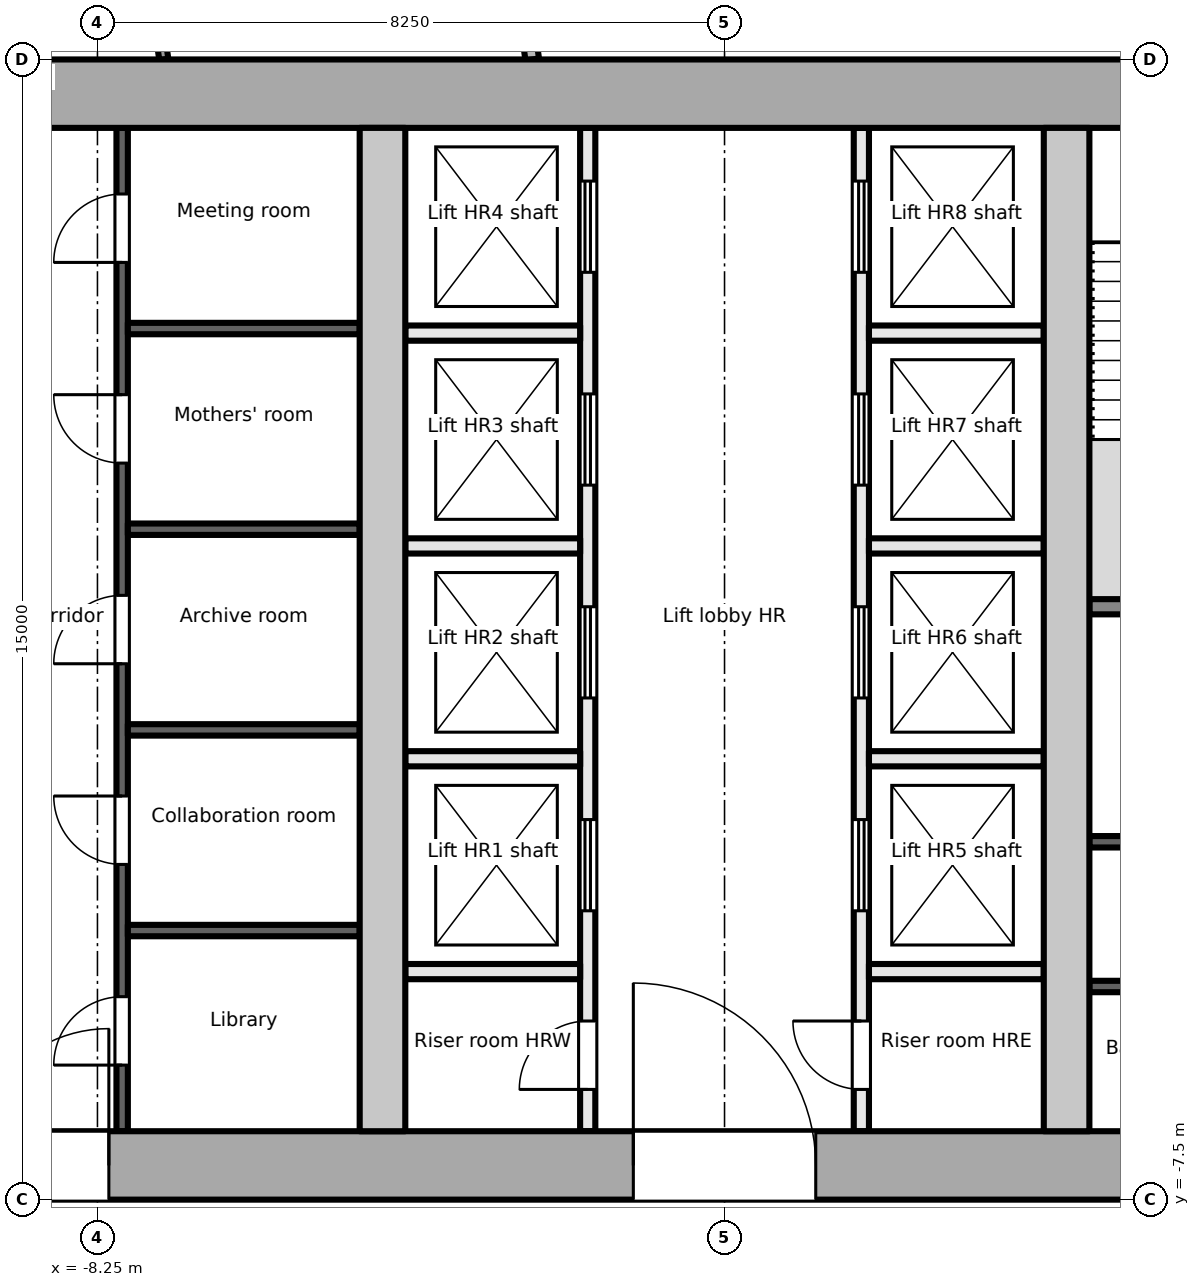
"""IFC4 building model, lengths in metres.
Left out: names, types, materials, properties, quantities, classifications, styles, units other than length and angle.
Written with IfcOpenShell. Run it as: python <this file> out.ifc"""

import sys

from ifc_helpers import new_model, si_unit, direction, frame, frame_2d, origin, place, context, subcontext, project, spatial, rectangle, extrude, element, fill, save


model = new_model("IFC4")
c1 = context("Model", 3, precision=1e-05, world=origin(), true_north=direction((0.0, 1.0)))
c2 = subcontext(c1, "Body", "Model", "MODEL_VIEW")
j1 = project(units=[si_unit("LENGTHUNIT", "METRE"), si_unit("PLANEANGLEUNIT", "RADIAN")], contexts=[c1])
p1 = place(None, origin())
s1 = spatial("IfcSite", under=j1, at=p1, CompositionType="ELEMENT")
p2 = place(p1, origin())
s2 = spatial("IfcBuilding", under=s1, at=p2, CompositionType="ELEMENT")
p3 = place(p2, frame((0.0, 0.0, 233.0)))
s3 = spatial("IfcBuildingStorey", under=s2, at=p3, CompositionType="ELEMENT", Elevation=233.0)
p4 = place(p3, frame((-18.0, -7.05, -0.2), z_axis=(0.0, 0.0, 1.0), x_axis=(1.0, 0.0, 0.0)))
e1 = element("IfcWall", 1, at=p4, inside=s3, PredefinedType="SHEAR", context=c2, shape_type="SweptSolid", body=[
    extrude(rectangle(XDim=36.0, YDim=0.9, at=frame_2d((18.0, 0.0))), origin(), (0.0, 0.0, 1.0), 3.9),
])
p5 = place(p4, frame((8.1, 0.0, 0.2)))
e2 = element("IfcOpeningElement", 2, at=p5, cuts=e1, PredefinedType="OPENING", context=c2, shape_type="SweptSolid", body=[
    extrude(rectangle(XDim=1.8, YDim=2.1, at=frame_2d((0.9, 1.05))), frame((0.0, 0.46, 0.0), z_axis=(0.0, -1.0, 0.0), x_axis=(1.0, 0.0, 0.0)), (0.0, 0.0, 1.0), 0.921),
])
p6 = place(p4, frame((16.8, 0.0, 0.2)))
e3 = element("IfcOpeningElement", 3, at=p6, cuts=e1, PredefinedType="OPENING", context=c2, shape_type="SweptSolid", body=[
    extrude(rectangle(XDim=2.4, YDim=2.1, at=frame_2d((1.2, 1.05))), frame((0.0, 0.46, 0.0), z_axis=(0.0, -1.0, 0.0), x_axis=(1.0, 0.0, 0.0)), (0.0, 0.0, 1.0), 0.921),
])
p7 = place(p4, frame((26.1, 0.0, 0.2)))
e4 = element("IfcOpeningElement", 4, at=p7, cuts=e1, PredefinedType="OPENING", context=c2, shape_type="SweptSolid", body=[
    extrude(rectangle(XDim=2.4, YDim=2.1, at=frame_2d((1.2, 1.05))), frame((0.0, 0.46, 0.0), z_axis=(0.0, -1.0, 0.0), x_axis=(1.0, 0.0, 0.0)), (0.0, 0.0, 1.0), 0.921),
])
p8 = place(p3, frame((-18.0, 7.05, -0.2), z_axis=(0.0, 0.0, 1.0), x_axis=(1.0, 0.0, 0.0)))
e5 = element("IfcWall", 5, at=p8, inside=s3, PredefinedType="SHEAR", context=c2, shape_type="SweptSolid", body=[
    extrude(rectangle(XDim=36.0, YDim=0.9, at=frame_2d((18.0, 0.0))), origin(), (0.0, 0.0, 1.0), 3.9),
])
for number, where, z_axis, x_axis in (
    (6, (-4.5, -6.6, -0.2), (0.0, 0.0, 1.0), (0.0, 1.0, 0.0)),
    (7, (4.5, -6.6, -0.2), (0.0, 0.0, 1.0), (0.0, 1.0, 0.0)),
):
    element("IfcWall", number, at=place(p3, frame(where, z_axis=z_axis, x_axis=x_axis)), inside=s3, PredefinedType="SHEAR", context=c2, shape_type="SweptSolid", body=[
        extrude(rectangle(XDim=13.2, YDim=0.6, at=frame_2d((6.6, 0.0))), origin(), (0.0, 0.0, 1.0), 3.9),
    ])
p9 = place(p3, frame((-7.925, -6.6, 0.0), z_axis=(0.0, 0.0, 1.0), x_axis=(0.0, 1.0, 0.0)))
e8 = element("IfcWall", 8, at=p9, inside=s3, PredefinedType="PARTITIONING", context=c2, shape_type="SweptSolid", body=[
    extrude(rectangle(XDim=13.2, YDim=0.15, at=frame_2d((6.6, 0.0))), origin(), (0.0, 0.0, 1.0), 3.7),
])
p10 = place(p9, frame((0.87, 0.0, 0.0)))
e9 = element("IfcOpeningElement", 9, at=p10, cuts=e8, PredefinedType="OPENING", context=c2, shape_type="SweptSolid", body=[
    extrude(rectangle(XDim=0.9, YDim=2.1, at=frame_2d((0.45, 1.05))), frame((0.0, 0.085, 0.0), z_axis=(0.0, -1.0, 0.0), x_axis=(1.0, 0.0, 0.0)), (0.0, 0.0, 1.0), 0.171),
])
p11 = place(p9, frame((3.51, 0.0, 0.0)))
e10 = element("IfcOpeningElement", 10, at=p11, cuts=e8, PredefinedType="OPENING", context=c2, shape_type="SweptSolid", body=[
    extrude(rectangle(XDim=0.9, YDim=2.1, at=frame_2d((0.45, 1.05))), frame((0.0, 0.085, 0.0), z_axis=(0.0, -1.0, 0.0), x_axis=(1.0, 0.0, 0.0)), (0.0, 0.0, 1.0), 0.171),
])
p12 = place(p9, frame((6.15, 0.0, 0.0)))
e11 = element("IfcOpeningElement", 11, at=p12, cuts=e8, PredefinedType="OPENING", context=c2, shape_type="SweptSolid", body=[
    extrude(rectangle(XDim=0.9, YDim=2.1, at=frame_2d((0.45, 1.05))), frame((0.0, 0.085, 0.0), z_axis=(0.0, -1.0, 0.0), x_axis=(1.0, 0.0, 0.0)), (0.0, 0.0, 1.0), 0.171),
])
p13 = place(p9, frame((8.79, 0.0, 0.0)))
e12 = element("IfcOpeningElement", 12, at=p13, cuts=e8, PredefinedType="OPENING", context=c2, shape_type="SweptSolid", body=[
    extrude(rectangle(XDim=0.9, YDim=2.1, at=frame_2d((0.45, 1.05))), frame((0.0, 0.085, 0.0), z_axis=(0.0, -1.0, 0.0), x_axis=(1.0, 0.0, 0.0)), (0.0, 0.0, 1.0), 0.171),
])
p14 = place(p9, frame((11.43, 0.0, 0.0)))
e13 = element("IfcOpeningElement", 13, at=p14, cuts=e8, PredefinedType="OPENING", context=c2, shape_type="SweptSolid", body=[
    extrude(rectangle(XDim=0.9, YDim=2.1, at=frame_2d((0.45, 1.05))), frame((0.0, 0.085, 0.0), z_axis=(0.0, -1.0, 0.0), x_axis=(1.0, 0.0, 0.0)), (0.0, 0.0, 1.0), 0.171),
])
for number, where, z_axis, x_axis in (
    (14, (-7.85, -3.96, 0.0), (0.0, 0.0, 1.0), (1.0, 0.0, 0.0)),
    (15, (-7.85, -1.32, 0.0), (0.0, 0.0, 1.0), (1.0, 0.0, 0.0)),
    (16, (-7.85, 1.32, 0.0), (0.0, 0.0, 1.0), (1.0, 0.0, 0.0)),
    (17, (-7.85, 3.96, 0.0), (0.0, 0.0, 1.0), (1.0, 0.0, 0.0)),
):
    element("IfcWall", number, at=place(p3, frame(where, z_axis=z_axis, x_axis=x_axis)), inside=s3, PredefinedType="PARTITIONING", context=c2, shape_type="SweptSolid", body=[
        extrude(rectangle(XDim=3.05, YDim=0.15, at=frame_2d((1.525, 0.0))), origin(), (0.0, 0.0, 1.0), 3.7),
    ])
p15 = place(p3, frame((-1.8, -6.6, 0.0), z_axis=(0.0, 0.0, 1.0), x_axis=(0.0, 1.0, 0.0)))
e18 = element("IfcWall", 18, at=p15, inside=s3, PredefinedType="PARTITIONING", context=c2, shape_type="SweptSolid", body=[
    extrude(rectangle(XDim=13.2, YDim=0.2, at=frame_2d((6.6, 0.0))), origin(), (0.0, 0.0, 1.0), 3.7),
])
p16 = place(p15, frame((0.55, 0.0, 0.0)))
e19 = element("IfcOpeningElement", 19, at=p16, cuts=e18, PredefinedType="OPENING", context=c2, shape_type="SweptSolid", body=[
    extrude(rectangle(XDim=0.9, YDim=2.1, at=frame_2d((0.45, 1.05))), frame((0.0, 0.111, 0.0), z_axis=(0.0, -1.0, 0.0), x_axis=(1.0, 0.0, 0.0)), (0.0, 0.0, 1.0), 0.221),
])
p17 = place(p15, frame((2.9, 0.0, 0.0)))
e20 = element("IfcOpeningElement", 20, at=p17, cuts=e18, PredefinedType="OPENING", context=c2, shape_type="SweptSolid", body=[
    extrude(rectangle(XDim=1.2, YDim=2.1, at=frame_2d((0.6, 1.05))), frame((0.0, 0.111, 0.0), z_axis=(0.0, -1.0, 0.0), x_axis=(1.0, 0.0, 0.0)), (0.0, 0.0, 1.0), 0.221),
])
p18 = place(p15, frame((5.7, 0.0, 0.0)))
e21 = element("IfcOpeningElement", 21, at=p18, cuts=e18, PredefinedType="OPENING", context=c2, shape_type="SweptSolid", body=[
    extrude(rectangle(XDim=1.2, YDim=2.1, at=frame_2d((0.6, 1.05))), frame((0.0, 0.111, 0.0), z_axis=(0.0, -1.0, 0.0), x_axis=(1.0, 0.0, 0.0)), (0.0, 0.0, 1.0), 0.221),
])
p19 = place(p15, frame((8.5, 0.0, 0.0)))
e22 = element("IfcOpeningElement", 22, at=p19, cuts=e18, PredefinedType="OPENING", context=c2, shape_type="SweptSolid", body=[
    extrude(rectangle(XDim=1.2, YDim=2.1, at=frame_2d((0.6, 1.05))), frame((0.0, 0.111, 0.0), z_axis=(0.0, -1.0, 0.0), x_axis=(1.0, 0.0, 0.0)), (0.0, 0.0, 1.0), 0.221),
])
p20 = place(p15, frame((11.3, 0.0, 0.0)))
e23 = element("IfcOpeningElement", 23, at=p20, cuts=e18, PredefinedType="OPENING", context=c2, shape_type="SweptSolid", body=[
    extrude(rectangle(XDim=1.2, YDim=2.1, at=frame_2d((0.6, 1.05))), frame((0.0, 0.111, 0.0), z_axis=(0.0, -1.0, 0.0), x_axis=(1.0, 0.0, 0.0)), (0.0, 0.0, 1.0), 0.221),
])
p21 = place(p3, frame((1.8, -6.6, 0.0), z_axis=(0.0, 0.0, 1.0), x_axis=(0.0, 1.0, 0.0)))
e24 = element("IfcWall", 24, at=p21, inside=s3, PredefinedType="PARTITIONING", context=c2, shape_type="SweptSolid", body=[
    extrude(rectangle(XDim=13.2, YDim=0.2, at=frame_2d((6.6, 0.0))), origin(), (0.0, 0.0, 1.0), 3.7),
])
p22 = place(p21, frame((0.55, 0.0, 0.0)))
e25 = element("IfcOpeningElement", 25, at=p22, cuts=e24, PredefinedType="OPENING", context=c2, shape_type="SweptSolid", body=[
    extrude(rectangle(XDim=0.9, YDim=2.1, at=frame_2d((0.45, 1.05))), frame((0.0, 0.111, 0.0), z_axis=(0.0, -1.0, 0.0), x_axis=(1.0, 0.0, 0.0)), (0.0, 0.0, 1.0), 0.221),
])
p23 = place(p21, frame((2.9, 0.0, 0.0)))
e26 = element("IfcOpeningElement", 26, at=p23, cuts=e24, PredefinedType="OPENING", context=c2, shape_type="SweptSolid", body=[
    extrude(rectangle(XDim=1.2, YDim=2.1, at=frame_2d((0.6, 1.05))), frame((0.0, 0.111, 0.0), z_axis=(0.0, -1.0, 0.0), x_axis=(1.0, 0.0, 0.0)), (0.0, 0.0, 1.0), 0.221),
])
p24 = place(p21, frame((5.7, 0.0, 0.0)))
e27 = element("IfcOpeningElement", 27, at=p24, cuts=e24, PredefinedType="OPENING", context=c2, shape_type="SweptSolid", body=[
    extrude(rectangle(XDim=1.2, YDim=2.1, at=frame_2d((0.6, 1.05))), frame((0.0, 0.111, 0.0), z_axis=(0.0, -1.0, 0.0), x_axis=(1.0, 0.0, 0.0)), (0.0, 0.0, 1.0), 0.221),
])
p25 = place(p21, frame((8.5, 0.0, 0.0)))
e28 = element("IfcOpeningElement", 28, at=p25, cuts=e24, PredefinedType="OPENING", context=c2, shape_type="SweptSolid", body=[
    extrude(rectangle(XDim=1.2, YDim=2.1, at=frame_2d((0.6, 1.05))), frame((0.0, 0.111, 0.0), z_axis=(0.0, -1.0, 0.0), x_axis=(1.0, 0.0, 0.0)), (0.0, 0.0, 1.0), 0.221),
])
p26 = place(p21, frame((11.3, 0.0, 0.0)))
e29 = element("IfcOpeningElement", 29, at=p26, cuts=e24, PredefinedType="OPENING", context=c2, shape_type="SweptSolid", body=[
    extrude(rectangle(XDim=1.2, YDim=2.1, at=frame_2d((0.6, 1.05))), frame((0.0, 0.111, 0.0), z_axis=(0.0, -1.0, 0.0), x_axis=(1.0, 0.0, 0.0)), (0.0, 0.0, 1.0), 0.221),
])
for number, where, z_axis, x_axis in (
    (30, (-4.2, -1.7, 0.0), (0.0, 0.0, 1.0), (1.0, 0.0, 0.0)),
    (31, (-4.2, 1.1, 0.0), (0.0, 0.0, 1.0), (1.0, 0.0, 0.0)),
    (32, (-4.2, 3.9, 0.0), (0.0, 0.0, 1.0), (1.0, 0.0, 0.0)),
    (33, (-4.2, -4.5, 0.0), (0.0, 0.0, 1.0), (1.0, 0.0, 0.0)),
    (34, (1.9, -1.7, 0.0), (0.0, 0.0, 1.0), (1.0, 0.0, 0.0)),
    (35, (1.9, 1.1, 0.0), (0.0, 0.0, 1.0), (1.0, 0.0, 0.0)),
    (36, (1.9, 3.9, 0.0), (0.0, 0.0, 1.0), (1.0, 0.0, 0.0)),
    (37, (1.9, -4.5, 0.0), (0.0, 0.0, 1.0), (1.0, 0.0, 0.0)),
):
    element("IfcWall", number, at=place(p3, frame(where, z_axis=z_axis, x_axis=x_axis)), inside=s3, PredefinedType="PARTITIONING", context=c2, shape_type="SweptSolid", body=[
        extrude(rectangle(XDim=2.3, YDim=0.2, at=frame_2d((1.15, 0.0))), origin(), (0.0, 0.0, 1.0), 3.7),
    ])
p27 = place(p3, frame((4.8, 0.3, 0.0), z_axis=(0.0, 0.0, 1.0), x_axis=(1.0, 0.0, 0.0)))
e38 = element("IfcWall", 38, at=p27, inside=s3, PredefinedType="PARTITIONING", context=c2, shape_type="SweptSolid", body=[
    extrude(rectangle(XDim=3.15, YDim=0.2, at=frame_2d((1.575, 0.0))), origin(), (0.0, 0.0, 1.0), 3.7),
])
for number, where, z_axis, x_axis in (
    (39, (4.8, -4.696, 0.0), (0.0, 0.0, 1.0), (1.0, 0.0, 0.0)),
    (40, (4.8, -2.792, 0.0), (0.0, 0.0, 1.0), (1.0, 0.0, 0.0)),
):
    element("IfcWall", number, at=place(p3, frame(where, z_axis=z_axis, x_axis=x_axis)), inside=s3, PredefinedType="PARTITIONING", context=c2, shape_type="SweptSolid", body=[
        extrude(rectangle(XDim=3.15, YDim=0.15, at=frame_2d((1.575, 0.0))), origin(), (0.0, 0.0, 1.0), 3.7),
    ])
p28 = place(p3, frame((-7.895, 11.188, 0.0), z_axis=(0.0, 0.0, 1.0), x_axis=(0.139108182039, -0.990277190331, 0.0)))
e41 = element("IfcWall", 41, at=p28, inside=s3, PredefinedType="PARTITIONING", context=c2, shape_type="SweptSolid", body=[
    extrude(rectangle(XDim=3.724, YDim=0.12, at=frame_2d((1.862, 0.0))), origin(), (0.0, 0.0, 1.0), 3.7),
])
p29 = place(p28, frame((1.412, 0.0, 0.0)))
e42 = element("IfcOpeningElement", 42, at=p29, cuts=e41, PredefinedType="OPENING", context=c2, shape_type="SweptSolid", body=[
    extrude(rectangle(XDim=0.9, YDim=2.1, at=frame_2d((0.45, 1.05))), frame((0.0, 0.071, 0.0), z_axis=(0.0, -1.0, 0.0), x_axis=(1.0, 0.0, 0.0)), (0.0, 0.0, 1.0), 0.141),
])
p30 = place(p3, frame((-2.632, 8.23, 0.0), z_axis=(0.0, 0.0, 1.0), x_axis=(0.138452925943, -0.99036901572, 0.0)))
e43 = element("IfcWall", 43, at=p30, inside=s3, PredefinedType="PARTITIONING", context=c2, shape_type="SweptSolid", body=[
    extrude(rectangle(XDim=0.737, YDim=0.18, at=frame_2d((0.369, 0.0))), origin(), (0.0, 0.0, 1.0), 3.7),
])
p31 = place(p10, origin())
e44 = element("IfcDoor", 44, at=p31, inside=s3, OperationType="SINGLE_SWING_LEFT", PredefinedType="DOOR", context=c2, shape_type="SweptSolid", body=[
    extrude(rectangle(XDim=0.9, YDim=2.1, at=frame_2d((0.45, 1.05))), frame((0.0, 0.025, 0.0), z_axis=(0.0, -1.0, 0.0), x_axis=(1.0, 0.0, 0.0)), (0.0, 0.0, 1.0), 0.05),
])
fill(e9, e44)
p32 = place(p11, origin())
e45 = element("IfcDoor", 45, at=p32, inside=s3, OperationType="SINGLE_SWING_RIGHT", PredefinedType="DOOR", context=c2, shape_type="SweptSolid", body=[
    extrude(rectangle(XDim=0.9, YDim=2.1, at=frame_2d((0.45, 1.05))), frame((0.0, 0.025, 0.0), z_axis=(0.0, -1.0, 0.0), x_axis=(1.0, 0.0, 0.0)), (0.0, 0.0, 1.0), 0.05),
])
fill(e10, e45)
p33 = place(p12, origin())
e46 = element("IfcDoor", 46, at=p33, inside=s3, OperationType="SINGLE_SWING_LEFT", PredefinedType="DOOR", context=c2, shape_type="SweptSolid", body=[
    extrude(rectangle(XDim=0.9, YDim=2.1, at=frame_2d((0.45, 1.05))), frame((0.0, 0.025, 0.0), z_axis=(0.0, -1.0, 0.0), x_axis=(1.0, 0.0, 0.0)), (0.0, 0.0, 1.0), 0.05),
])
fill(e11, e46)
p34 = place(p13, origin())
e47 = element("IfcDoor", 47, at=p34, inside=s3, OperationType="SINGLE_SWING_RIGHT", PredefinedType="DOOR", context=c2, shape_type="SweptSolid", body=[
    extrude(rectangle(XDim=0.9, YDim=2.1, at=frame_2d((0.45, 1.05))), frame((0.0, 0.025, 0.0), z_axis=(0.0, -1.0, 0.0), x_axis=(1.0, 0.0, 0.0)), (0.0, 0.0, 1.0), 0.05),
])
fill(e12, e47)
p35 = place(p14, origin())
e48 = element("IfcDoor", 48, at=p35, inside=s3, OperationType="SINGLE_SWING_LEFT", PredefinedType="DOOR", context=c2, shape_type="SweptSolid", body=[
    extrude(rectangle(XDim=0.9, YDim=2.1, at=frame_2d((0.45, 1.05))), frame((0.0, 0.025, 0.0), z_axis=(0.0, -1.0, 0.0), x_axis=(1.0, 0.0, 0.0)), (0.0, 0.0, 1.0), 0.05),
])
fill(e13, e48)
p36 = place(p5, origin())
e49 = element("IfcDoor", 49, at=p36, inside=s3, OperationType="SINGLE_SWING_RIGHT", PredefinedType="DOOR", context=c2, shape_type="SweptSolid", body=[
    extrude(rectangle(XDim=1.8, YDim=2.1, at=frame_2d((0.9, 1.05))), frame((0.0, 0.025, 0.0), z_axis=(0.0, -1.0, 0.0), x_axis=(1.0, 0.0, 0.0)), (0.0, 0.0, 1.0), 0.05),
])
fill(e2, e49)
p37 = place(p16, origin())
e50 = element("IfcDoor", 50, at=p37, inside=s3, OperationType="SINGLE_SWING_LEFT", PredefinedType="DOOR", context=c2, shape_type="SweptSolid", body=[
    extrude(rectangle(XDim=0.9, YDim=2.1, at=frame_2d((0.45, 1.05))), frame((0.0, 0.025, 0.0), z_axis=(0.0, -1.0, 0.0), x_axis=(1.0, 0.0, 0.0)), (0.0, 0.0, 1.0), 0.05),
])
fill(e19, e50)
p38 = place(p17, origin())
e51 = element("IfcDoor", 51, at=p38, inside=s3, OperationType="DOUBLE_DOOR_SLIDING", PredefinedType="DOOR", context=c2, shape_type="SweptSolid", body=[
    extrude(rectangle(XDim=1.2, YDim=2.1, at=frame_2d((0.6, 1.05))), frame((0.0, 0.025, 0.0), z_axis=(0.0, -1.0, 0.0), x_axis=(1.0, 0.0, 0.0)), (0.0, 0.0, 1.0), 0.05),
])
fill(e20, e51)
p39 = place(p18, origin())
e52 = element("IfcDoor", 52, at=p39, inside=s3, OperationType="DOUBLE_DOOR_SLIDING", PredefinedType="DOOR", context=c2, shape_type="SweptSolid", body=[
    extrude(rectangle(XDim=1.2, YDim=2.1, at=frame_2d((0.6, 1.05))), frame((0.0, 0.025, 0.0), z_axis=(0.0, -1.0, 0.0), x_axis=(1.0, 0.0, 0.0)), (0.0, 0.0, 1.0), 0.05),
])
fill(e21, e52)
p40 = place(p19, origin())
e53 = element("IfcDoor", 53, at=p40, inside=s3, OperationType="DOUBLE_DOOR_SLIDING", PredefinedType="DOOR", context=c2, shape_type="SweptSolid", body=[
    extrude(rectangle(XDim=1.2, YDim=2.1, at=frame_2d((0.6, 1.05))), frame((0.0, 0.025, 0.0), z_axis=(0.0, -1.0, 0.0), x_axis=(1.0, 0.0, 0.0)), (0.0, 0.0, 1.0), 0.05),
])
fill(e22, e53)
p41 = place(p20, origin())
e54 = element("IfcDoor", 54, at=p41, inside=s3, OperationType="DOUBLE_DOOR_SLIDING", PredefinedType="DOOR", context=c2, shape_type="SweptSolid", body=[
    extrude(rectangle(XDim=1.2, YDim=2.1, at=frame_2d((0.6, 1.05))), frame((0.0, 0.025, 0.0), z_axis=(0.0, -1.0, 0.0), x_axis=(1.0, 0.0, 0.0)), (0.0, 0.0, 1.0), 0.05),
])
fill(e23, e54)
p42 = place(p22, origin())
e55 = element("IfcDoor", 55, at=p42, inside=s3, OperationType="SINGLE_SWING_RIGHT", PredefinedType="DOOR", context=c2, shape_type="SweptSolid", body=[
    extrude(rectangle(XDim=0.9, YDim=2.1, at=frame_2d((0.45, 1.05))), frame((0.0, 0.025, 0.0), z_axis=(0.0, -1.0, 0.0), x_axis=(1.0, 0.0, 0.0)), (0.0, 0.0, 1.0), 0.05),
])
fill(e25, e55)
p43 = place(p23, origin())
e56 = element("IfcDoor", 56, at=p43, inside=s3, OperationType="DOUBLE_DOOR_SLIDING", PredefinedType="DOOR", context=c2, shape_type="SweptSolid", body=[
    extrude(rectangle(XDim=1.2, YDim=2.1, at=frame_2d((0.6, 1.05))), frame((0.0, 0.025, 0.0), z_axis=(0.0, -1.0, 0.0), x_axis=(1.0, 0.0, 0.0)), (0.0, 0.0, 1.0), 0.05),
])
fill(e26, e56)
p44 = place(p24, origin())
e57 = element("IfcDoor", 57, at=p44, inside=s3, OperationType="DOUBLE_DOOR_SLIDING", PredefinedType="DOOR", context=c2, shape_type="SweptSolid", body=[
    extrude(rectangle(XDim=1.2, YDim=2.1, at=frame_2d((0.6, 1.05))), frame((0.0, 0.025, 0.0), z_axis=(0.0, -1.0, 0.0), x_axis=(1.0, 0.0, 0.0)), (0.0, 0.0, 1.0), 0.05),
])
fill(e27, e57)
p45 = place(p25, origin())
e58 = element("IfcDoor", 58, at=p45, inside=s3, OperationType="DOUBLE_DOOR_SLIDING", PredefinedType="DOOR", context=c2, shape_type="SweptSolid", body=[
    extrude(rectangle(XDim=1.2, YDim=2.1, at=frame_2d((0.6, 1.05))), frame((0.0, 0.025, 0.0), z_axis=(0.0, -1.0, 0.0), x_axis=(1.0, 0.0, 0.0)), (0.0, 0.0, 1.0), 0.05),
])
fill(e28, e58)
p46 = place(p26, origin())
e59 = element("IfcDoor", 59, at=p46, inside=s3, OperationType="DOUBLE_DOOR_SLIDING", PredefinedType="DOOR", context=c2, shape_type="SweptSolid", body=[
    extrude(rectangle(XDim=1.2, YDim=2.1, at=frame_2d((0.6, 1.05))), frame((0.0, 0.025, 0.0), z_axis=(0.0, -1.0, 0.0), x_axis=(1.0, 0.0, 0.0)), (0.0, 0.0, 1.0), 0.05),
])
fill(e29, e59)
p47 = place(p6, origin())
e60 = element("IfcDoor", 60, at=p47, inside=s3, OperationType="DOUBLE_DOOR_DOUBLE_SWING", PredefinedType="DOOR", context=c2, shape_type="SweptSolid", body=[
    extrude(rectangle(XDim=2.4, YDim=2.1, at=frame_2d((1.2, 1.05))), frame((0.0, 0.025, 0.0), z_axis=(0.0, -1.0, 0.0), x_axis=(1.0, 0.0, 0.0)), (0.0, 0.0, 1.0), 0.05),
])
fill(e3, e60)
save(model, sys.argv[1])
